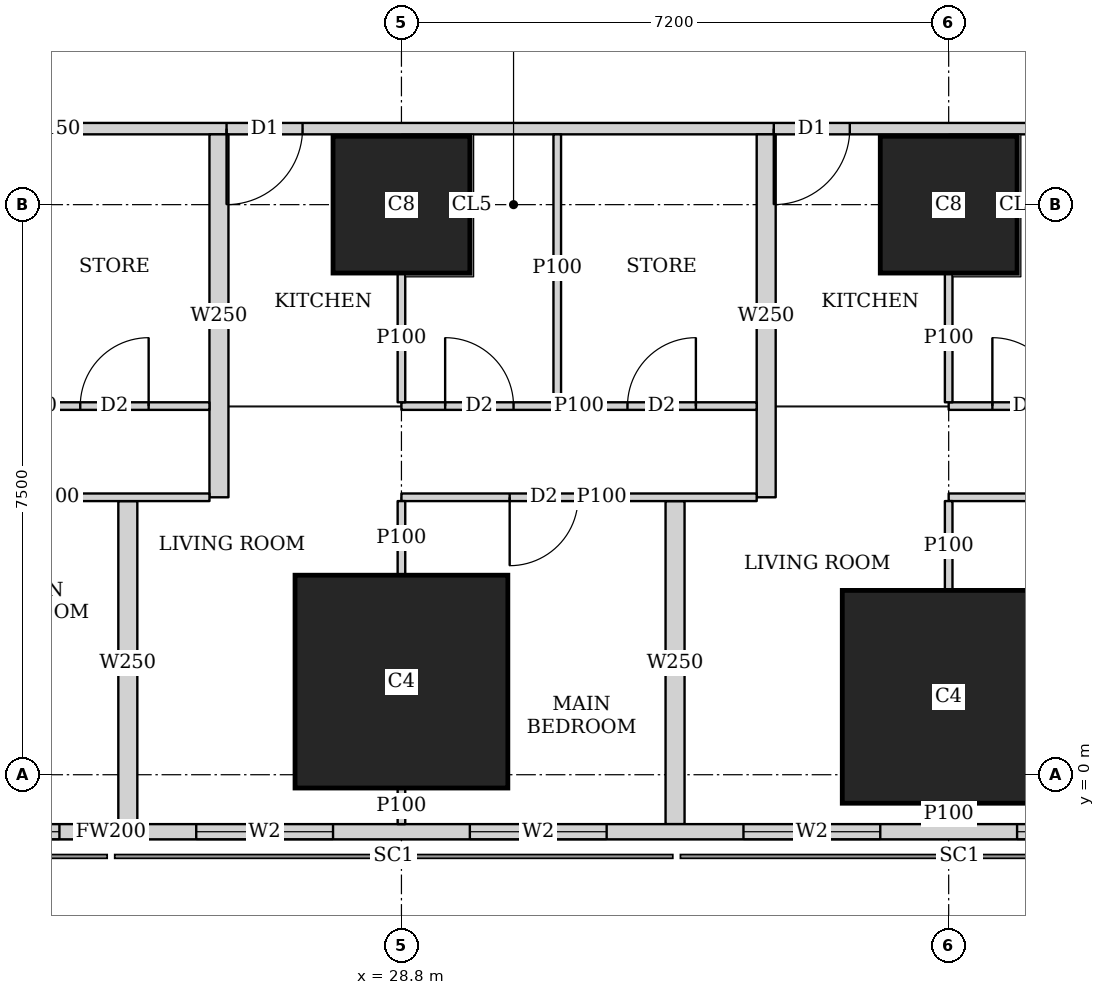
"""IFC4 building model, lengths in metres.
Left out: names, types, materials, properties, quantities, classifications, styles, units other than length and angle.
Written with IfcOpenShell. Run it as: python <this file> out.ifc"""

import sys

from ifc_helpers import new_model, si_unit, direction, frame, frame_2d, origin, origin_2d, place, context, subcontext, project, spatial, rectangle, extrude, element, fill, save


model = new_model("IFC4")
c1 = context("Model", 3, precision=1e-05, world=origin(), true_north=direction((0.0, 1.0)))
c2 = subcontext(c1, "Body", "Model", "MODEL_VIEW")
j1 = project(units=[si_unit("LENGTHUNIT", "METRE"), si_unit("PLANEANGLEUNIT", "RADIAN")], contexts=[c1])
p1 = place(None, origin())
s1 = spatial("IfcSite", under=j1, at=p1, CompositionType="ELEMENT")
p2 = place(p1, origin())
s2 = spatial("IfcBuilding", under=s1, at=p2, CompositionType="ELEMENT")
p3 = place(p2, frame((0.0, 0.0, 65.0)))
s3 = spatial("IfcBuildingStorey", under=s2, at=p3, CompositionType="ELEMENT", Elevation=65.0)
for number, where, z_axis, x_axis in (
    (1, (28.8, 1.225, 0.0), (0.0, 0.0, 1.0), (1.0, 0.0, 0.0)),
    (2, (36.0, 1.025, 0.0), (0.0, 0.0, 1.0), (1.0, 0.0, 0.0)),
):
    element("IfcColumn", number, at=place(p3, frame(where, z_axis=z_axis, x_axis=x_axis)), inside=s3, PredefinedType="COLUMN", context=c2, shape_type="SweptSolid", body=[
        extrude(rectangle(XDim=2.8, YDim=2.8, at=origin_2d()), origin(), (0.0, 0.0, 1.0), 3.75),
    ])
for number, where, z_axis, x_axis in (
    (3, (28.8, 7.5, 0.0), (0.0, 0.0, 1.0), (1.0, 0.0, 0.0)),
    (4, (36.0, 7.5, 0.0), (0.0, 0.0, 1.0), (1.0, 0.0, 0.0)),
):
    element("IfcColumn", number, at=place(p3, frame(where, z_axis=z_axis, x_axis=x_axis)), inside=s3, PredefinedType="COLUMN", context=c2, shape_type="SweptSolid", body=[
        extrude(rectangle(XDim=1.8, YDim=1.8, at=origin_2d()), origin(), (0.0, 0.0, 1.0), 3.75),
    ])
p4 = place(p3, frame((2.163, -0.75, 0.0), z_axis=(0.0, 0.0, 1.0), x_axis=(1.0, 0.0, 0.0)))
e5 = element("IfcWall", 5, at=p4, inside=s3, PredefinedType="SOLIDWALL", context=c2, shape_type="SweptSolid", body=[
    extrude(rectangle(XDim=45.628, YDim=0.2, at=frame_2d((22.814, 0.0))), origin(), (0.0, 0.0, 1.0), 3.5),
])
p5 = place(p4, frame((9.537, 0.0, 0.9)))
e6 = element("IfcOpeningElement", 6, at=p5, cuts=e5, PredefinedType="OPENING", context=c2, shape_type="SweptSolid", body=[
    extrude(rectangle(XDim=1.8, YDim=1.5, at=frame_2d((0.9, 0.75))), frame((0.0, 0.11, 0.0), z_axis=(0.0, -1.0, 0.0), x_axis=(1.0, 0.0, 0.0)), (0.0, 0.0, 1.0), 0.22),
])
p6 = place(p4, frame((13.137, 0.0, 0.9)))
e7 = element("IfcOpeningElement", 7, at=p6, cuts=e5, PredefinedType="OPENING", context=c2, shape_type="SweptSolid", body=[
    extrude(rectangle(XDim=1.8, YDim=1.5, at=frame_2d((0.9, 0.75))), frame((0.0, 0.11, 0.0), z_axis=(0.0, -1.0, 0.0), x_axis=(1.0, 0.0, 0.0)), (0.0, 0.0, 1.0), 0.22),
])
p7 = place(p4, frame((16.737, 0.0, 0.9)))
e8 = element("IfcOpeningElement", 8, at=p7, cuts=e5, PredefinedType="OPENING", context=c2, shape_type="SweptSolid", body=[
    extrude(rectangle(XDim=1.8, YDim=1.5, at=frame_2d((0.9, 0.75))), frame((0.0, 0.11, 0.0), z_axis=(0.0, -1.0, 0.0), x_axis=(1.0, 0.0, 0.0)), (0.0, 0.0, 1.0), 0.22),
])
p8 = place(p4, frame((20.337, 0.0, 0.9)))
e9 = element("IfcOpeningElement", 9, at=p8, cuts=e5, PredefinedType="OPENING", context=c2, shape_type="SweptSolid", body=[
    extrude(rectangle(XDim=1.8, YDim=1.5, at=frame_2d((0.9, 0.75))), frame((0.0, 0.11, 0.0), z_axis=(0.0, -1.0, 0.0), x_axis=(1.0, 0.0, 0.0)), (0.0, 0.0, 1.0), 0.22),
])
p9 = place(p4, frame((23.937, 0.0, 0.9)))
e10 = element("IfcOpeningElement", 10, at=p9, cuts=e5, PredefinedType="OPENING", context=c2, shape_type="SweptSolid", body=[
    extrude(rectangle(XDim=1.8, YDim=1.5, at=frame_2d((0.9, 0.75))), frame((0.0, 0.11, 0.0), z_axis=(0.0, -1.0, 0.0), x_axis=(1.0, 0.0, 0.0)), (0.0, 0.0, 1.0), 0.22),
])
p10 = place(p4, frame((27.537, 0.0, 0.9)))
e11 = element("IfcOpeningElement", 11, at=p10, cuts=e5, PredefinedType="OPENING", context=c2, shape_type="SweptSolid", body=[
    extrude(rectangle(XDim=1.8, YDim=1.5, at=frame_2d((0.9, 0.75))), frame((0.0, 0.11, 0.0), z_axis=(0.0, -1.0, 0.0), x_axis=(1.0, 0.0, 0.0)), (0.0, 0.0, 1.0), 0.22),
])
p11 = place(p4, frame((31.137, 0.0, 0.9)))
e12 = element("IfcOpeningElement", 12, at=p11, cuts=e5, PredefinedType="OPENING", context=c2, shape_type="SweptSolid", body=[
    extrude(rectangle(XDim=1.8, YDim=1.5, at=frame_2d((0.9, 0.75))), frame((0.0, 0.11, 0.0), z_axis=(0.0, -1.0, 0.0), x_axis=(1.0, 0.0, 0.0)), (0.0, 0.0, 1.0), 0.22),
])
p12 = place(p4, frame((34.737, 0.0, 0.9)))
e13 = element("IfcOpeningElement", 13, at=p12, cuts=e5, PredefinedType="OPENING", context=c2, shape_type="SweptSolid", body=[
    extrude(rectangle(XDim=1.8, YDim=1.5, at=frame_2d((0.9, 0.75))), frame((0.0, 0.11, 0.0), z_axis=(0.0, -1.0, 0.0), x_axis=(1.0, 0.0, 0.0)), (0.0, 0.0, 1.0), 0.22),
])
p13 = place(p3, frame((40.054, 8.5, 0.0), z_axis=(0.0, 0.0, 1.0), x_axis=(-1.0, 0.0, 0.0)))
e14 = element("IfcWall", 14, at=p13, inside=s3, PredefinedType="SOLIDWALL", context=c2, shape_type="SweptSolid", body=[
    extrude(rectangle(XDim=31.704, YDim=0.15, at=frame_2d((15.852, 0.0))), origin(), (0.0, 0.0, 1.0), 3.5),
])
p14 = place(p13, frame((28.104, 0.0, 0.0)))
e15 = element("IfcOpeningElement", 15, at=p14, cuts=e14, PredefinedType="OPENING", context=c2, shape_type="SweptSolid", body=[
    extrude(rectangle(XDim=1.0, YDim=2.1, at=frame_2d((0.5, 1.05))), frame((0.0, 0.085, 0.0), z_axis=(0.0, -1.0, 0.0), x_axis=(1.0, 0.0, 0.0)), (0.0, 0.0, 1.0), 0.17),
])
p15 = place(p13, frame((19.755, 0.0, 0.0)))
e16 = element("IfcOpeningElement", 16, at=p15, cuts=e14, PredefinedType="OPENING", context=c2, shape_type="SweptSolid", body=[
    extrude(rectangle(XDim=1.0, YDim=2.1, at=frame_2d((0.5, 1.05))), frame((0.0, 0.085, 0.0), z_axis=(0.0, -1.0, 0.0), x_axis=(1.0, 0.0, 0.0)), (0.0, 0.0, 1.0), 0.17),
])
p16 = place(p13, frame((12.555, 0.0, 0.0)))
e17 = element("IfcOpeningElement", 17, at=p16, cuts=e14, PredefinedType="OPENING", context=c2, shape_type="SweptSolid", body=[
    extrude(rectangle(XDim=1.0, YDim=2.1, at=frame_2d((0.5, 1.05))), frame((0.0, 0.085, 0.0), z_axis=(0.0, -1.0, 0.0), x_axis=(1.0, 0.0, 0.0)), (0.0, 0.0, 1.0), 0.17),
])
p17 = place(p13, frame((5.355, 0.0, 0.0)))
e18 = element("IfcOpeningElement", 18, at=p17, cuts=e14, PredefinedType="OPENING", context=c2, shape_type="SweptSolid", body=[
    extrude(rectangle(XDim=1.0, YDim=2.1, at=frame_2d((0.5, 1.05))), frame((0.0, 0.085, 0.0), z_axis=(0.0, -1.0, 0.0), x_axis=(1.0, 0.0, 0.0)), (0.0, 0.0, 1.0), 0.17),
])
p18 = place(p3, frame((33.68, 42.723, 0.0), z_axis=(0.0, 0.0, 1.0), x_axis=(0.185624129307, -0.98262082342, 0.0)))
e19 = element("IfcWall", 19, at=p18, inside=s3, PredefinedType="SOLIDWALL", context=c2, shape_type="SweptSolid", body=[
    extrude(rectangle(XDim=41.051, YDim=0.15, at=frame_2d((20.526, 0.0))), origin(), (0.0, 0.0, 1.0), 2.5),
])
p19 = place(p18, frame((13.577, 0.0, 0.0)))
e20 = element("IfcOpeningElement", 20, at=p19, cuts=e19, PredefinedType="OPENING", context=c2, shape_type="SweptSolid", body=[
    extrude(rectangle(XDim=1.0, YDim=2.1, at=frame_2d((0.5, 1.05))), frame((0.0, 0.085, 0.0), z_axis=(0.0, -1.0, 0.0), x_axis=(1.0, 0.0, 0.0)), (0.0, 0.0, 1.0), 0.17),
])
p20 = place(p18, frame((17.394, 0.0, 0.0)))
e21 = element("IfcOpeningElement", 21, at=p20, cuts=e19, PredefinedType="OPENING", context=c2, shape_type="SweptSolid", body=[
    extrude(rectangle(XDim=1.0, YDim=2.1, at=frame_2d((0.5, 1.05))), frame((0.0, 0.085, 0.0), z_axis=(0.0, -1.0, 0.0), x_axis=(1.0, 0.0, 0.0)), (0.0, 0.0, 1.0), 0.17),
])
p21 = place(p18, frame((26.758, 0.0, 0.0)))
e22 = element("IfcOpeningElement", 22, at=p21, cuts=e19, PredefinedType="OPENING", context=c2, shape_type="SweptSolid", body=[
    extrude(rectangle(XDim=1.0, YDim=2.1, at=frame_2d((0.5, 1.05))), frame((0.0, 0.085, 0.0), z_axis=(0.0, -1.0, 0.0), x_axis=(1.0, 0.0, 0.0)), (0.0, 0.0, 1.0), 0.17),
])
p22 = place(p18, frame((32.193, 0.0, 0.0)))
e23 = element("IfcOpeningElement", 23, at=p22, cuts=e19, PredefinedType="OPENING", context=c2, shape_type="SweptSolid", body=[
    extrude(rectangle(XDim=1.0, YDim=2.1, at=frame_2d((0.5, 1.05))), frame((0.0, 0.085, 0.0), z_axis=(0.0, -1.0, 0.0), x_axis=(1.0, 0.0, 0.0)), (0.0, 0.0, 1.0), 0.17),
])
p23 = place(p3, frame((26.274, 3.65, 0.0), z_axis=(0.0, 0.0, 1.0), x_axis=(-1.0, 0.0, 0.0)))
e24 = element("IfcWall", 24, at=p23, inside=s3, PredefinedType="PARTITIONING", context=c2, shape_type="SweptSolid", body=[
    extrude(rectangle(XDim=4.674, YDim=0.1, at=frame_2d((2.337, 0.0))), origin(), (0.0, 0.0, 1.0), 3.5),
])
p24 = place(p23, frame((2.35, 0.0, 0.0)))
e25 = element("IfcOpeningElement", 25, at=p24, cuts=e24, PredefinedType="OPENING", context=c2, shape_type="SweptSolid", body=[
    extrude(rectangle(XDim=0.9, YDim=2.1, at=frame_2d((0.45, 1.05))), frame((0.0, 0.06, 0.0), z_axis=(0.0, -1.0, 0.0), x_axis=(1.0, 0.0, 0.0)), (0.0, 0.0, 1.0), 0.12),
])
p25 = place(p3, frame((26.274, 4.85, 0.0), z_axis=(0.0, 0.0, 1.0), x_axis=(-1.0, 0.0, 0.0)))
e26 = element("IfcWall", 26, at=p25, inside=s3, PredefinedType="PARTITIONING", context=c2, shape_type="SweptSolid", body=[
    extrude(rectangle(XDim=4.674, YDim=0.1, at=frame_2d((2.337, 0.0))), origin(), (0.0, 0.0, 1.0), 3.5),
])
p26 = place(p25, frame((3.199, 0.0, 0.0)))
e27 = element("IfcOpeningElement", 27, at=p26, cuts=e26, PredefinedType="OPENING", context=c2, shape_type="SweptSolid", body=[
    extrude(rectangle(XDim=0.9, YDim=2.1, at=frame_2d((0.45, 1.05))), frame((0.0, 0.06, 0.0), z_axis=(0.0, -1.0, 0.0), x_axis=(1.0, 0.0, 0.0)), (0.0, 0.0, 1.0), 0.12),
])
p27 = place(p25, frame((0.8, 0.0, 0.0)))
e28 = element("IfcOpeningElement", 28, at=p27, cuts=e26, PredefinedType="OPENING", context=c2, shape_type="SweptSolid", body=[
    extrude(rectangle(XDim=0.9, YDim=2.1, at=frame_2d((0.45, 1.05))), frame((0.0, 0.06, 0.0), z_axis=(0.0, -1.0, 0.0), x_axis=(1.0, 0.0, 0.0)), (0.0, 0.0, 1.0), 0.12),
])
p28 = place(p3, frame((33.474, 3.65, 0.0), z_axis=(0.0, 0.0, 1.0), x_axis=(-1.0, 0.0, 0.0)))
e29 = element("IfcWall", 29, at=p28, inside=s3, PredefinedType="PARTITIONING", context=c2, shape_type="SweptSolid", body=[
    extrude(rectangle(XDim=4.674, YDim=0.1, at=frame_2d((2.337, 0.0))), origin(), (0.0, 0.0, 1.0), 3.5),
])
p29 = place(p28, frame((2.35, 0.0, 0.0)))
e30 = element("IfcOpeningElement", 30, at=p29, cuts=e29, PredefinedType="OPENING", context=c2, shape_type="SweptSolid", body=[
    extrude(rectangle(XDim=0.9, YDim=2.1, at=frame_2d((0.45, 1.05))), frame((0.0, 0.06, 0.0), z_axis=(0.0, -1.0, 0.0), x_axis=(1.0, 0.0, 0.0)), (0.0, 0.0, 1.0), 0.12),
])
p30 = place(p3, frame((33.474, 4.85, 0.0), z_axis=(0.0, 0.0, 1.0), x_axis=(-1.0, 0.0, 0.0)))
e31 = element("IfcWall", 31, at=p30, inside=s3, PredefinedType="PARTITIONING", context=c2, shape_type="SweptSolid", body=[
    extrude(rectangle(XDim=4.674, YDim=0.1, at=frame_2d((2.337, 0.0))), origin(), (0.0, 0.0, 1.0), 3.5),
])
p31 = place(p30, frame((3.199, 0.0, 0.0)))
e32 = element("IfcOpeningElement", 32, at=p31, cuts=e31, PredefinedType="OPENING", context=c2, shape_type="SweptSolid", body=[
    extrude(rectangle(XDim=0.9, YDim=2.1, at=frame_2d((0.45, 1.05))), frame((0.0, 0.06, 0.0), z_axis=(0.0, -1.0, 0.0), x_axis=(1.0, 0.0, 0.0)), (0.0, 0.0, 1.0), 0.12),
])
p32 = place(p30, frame((0.8, 0.0, 0.0)))
e33 = element("IfcOpeningElement", 33, at=p32, cuts=e31, PredefinedType="OPENING", context=c2, shape_type="SweptSolid", body=[
    extrude(rectangle(XDim=0.9, YDim=2.1, at=frame_2d((0.45, 1.05))), frame((0.0, 0.06, 0.0), z_axis=(0.0, -1.0, 0.0), x_axis=(1.0, 0.0, 0.0)), (0.0, 0.0, 1.0), 0.12),
])
p33 = place(p3, frame((28.8, -0.65, 0.0), z_axis=(0.0, 0.0, 1.0), x_axis=(0.0, 1.0, 0.0)))
e34 = element("IfcWall", 34, at=p33, inside=s3, PredefinedType="PARTITIONING", context=c2, shape_type="SweptSolid", body=[
    extrude(rectangle(XDim=0.474, YDim=0.1, at=frame_2d((0.237, 0.0))), origin(), (0.0, 0.0, 1.0), 3.5),
])
p34 = place(p3, frame((28.8, 2.626, 0.0), z_axis=(0.0, 0.0, 1.0), x_axis=(0.0, 1.0, 0.0)))
e35 = element("IfcWall", 35, at=p34, inside=s3, PredefinedType="PARTITIONING", context=c2, shape_type="SweptSolid", body=[
    extrude(rectangle(XDim=0.974, YDim=0.1, at=frame_2d((0.487, 0.0))), origin(), (0.0, 0.0, 1.0), 3.5),
])
p35 = place(p3, frame((28.8, 4.9, 0.0), z_axis=(0.0, 0.0, 1.0), x_axis=(0.0, 1.0, 0.0)))
e36 = element("IfcWall", 36, at=p35, inside=s3, PredefinedType="PARTITIONING", context=c2, shape_type="SweptSolid", body=[
    extrude(rectangle(XDim=1.699, YDim=0.1, at=frame_2d((0.85, 0.0))), origin(), (0.0, 0.0, 1.0), 3.5),
])
p36 = place(p3, frame((30.85, 4.9, 0.0), z_axis=(0.0, 0.0, 1.0), x_axis=(0.0, 1.0, 0.0)))
e37 = element("IfcWall", 37, at=p36, inside=s3, PredefinedType="PARTITIONING", context=c2, shape_type="SweptSolid", body=[
    extrude(rectangle(XDim=3.525, YDim=0.1, at=frame_2d((1.763, 0.0))), origin(), (0.0, 0.0, 1.0), 3.5),
])
p37 = place(p3, frame((25.2, -0.65, 0.0), z_axis=(0.0, 0.0, 1.0), x_axis=(0.0, 1.0, 0.0)))
e38 = element("IfcWall", 38, at=p37, inside=s3, PredefinedType="SOLIDWALL", context=c2, shape_type="SweptSolid", body=[
    extrude(rectangle(XDim=4.25, YDim=0.25, at=frame_2d((2.125, 0.0))), origin(), (0.0, 0.0, 1.0), 2.05),
])
p38 = place(p3, frame((26.399, 3.65, 0.0), z_axis=(0.0, 0.0, 1.0), x_axis=(0.0, 1.0, 0.0)))
e39 = element("IfcWall", 39, at=p38, inside=s3, PredefinedType="SOLIDWALL", context=c2, shape_type="SweptSolid", body=[
    extrude(rectangle(XDim=4.775, YDim=0.25, at=frame_2d((2.388, 0.0))), origin(), (0.0, 0.0, 1.0), 3.5),
])
p39 = place(p3, frame((40.975, 3.65, 0.0), z_axis=(0.0, 0.0, 1.0), x_axis=(-1.0, 0.0, 0.0)))
e40 = element("IfcWall", 40, at=p39, inside=s3, PredefinedType="PARTITIONING", context=c2, shape_type="SweptSolid", body=[
    extrude(rectangle(XDim=4.975, YDim=0.1, at=frame_2d((2.488, 0.0))), origin(), (0.0, 0.0, 1.0), 3.5),
])
p40 = place(p39, frame((2.65, 0.0, 0.0)))
e41 = element("IfcOpeningElement", 41, at=p40, cuts=e40, PredefinedType="OPENING", context=c2, shape_type="SweptSolid", body=[
    extrude(rectangle(XDim=0.9, YDim=2.1, at=frame_2d((0.45, 1.05))), frame((0.0, 0.06, 0.0), z_axis=(0.0, -1.0, 0.0), x_axis=(1.0, 0.0, 0.0)), (0.0, 0.0, 1.0), 0.12),
])
p41 = place(p3, frame((40.748, 4.85, 0.0), z_axis=(0.0, 0.0, 1.0), x_axis=(-1.0, 0.0, 0.0)))
e42 = element("IfcWall", 42, at=p41, inside=s3, PredefinedType="PARTITIONING", context=c2, shape_type="SweptSolid", body=[
    extrude(rectangle(XDim=4.748, YDim=0.1, at=frame_2d((2.374, 0.0))), origin(), (0.0, 0.0, 1.0), 3.5),
])
p42 = place(p41, frame((3.273, 0.0, 0.0)))
e43 = element("IfcOpeningElement", 43, at=p42, cuts=e42, PredefinedType="OPENING", context=c2, shape_type="SweptSolid", body=[
    extrude(rectangle(XDim=0.9, YDim=2.1, at=frame_2d((0.45, 1.05))), frame((0.0, 0.06, 0.0), z_axis=(0.0, -1.0, 0.0), x_axis=(1.0, 0.0, 0.0)), (0.0, 0.0, 1.0), 0.12),
])
p43 = place(p41, frame((0.15, 0.0, 0.0)))
e44 = element("IfcOpeningElement", 44, at=p43, cuts=e42, PredefinedType="OPENING", context=c2, shape_type="SweptSolid", body=[
    extrude(rectangle(XDim=0.9, YDim=2.1, at=frame_2d((0.45, 1.05))), frame((0.0, 0.06, 0.0), z_axis=(0.0, -1.0, 0.0), x_axis=(1.0, 0.0, 0.0)), (0.0, 0.0, 1.0), 0.12),
])
p44 = place(p41, frame((1.473, 0.0, 0.0)))
e45 = element("IfcOpeningElement", 45, at=p44, cuts=e42, PredefinedType="OPENING", context=c2, shape_type="SweptSolid", body=[
    extrude(rectangle(XDim=0.9, YDim=2.1, at=frame_2d((0.45, 1.05))), frame((0.0, 0.06, 0.0), z_axis=(0.0, -1.0, 0.0), x_axis=(1.0, 0.0, 0.0)), (0.0, 0.0, 1.0), 0.12),
])
p45 = place(p3, frame((36.0, -0.65, 0.0), z_axis=(0.0, 0.0, 1.0), x_axis=(0.0, 1.0, 0.0)))
e46 = element("IfcWall", 46, at=p45, inside=s3, PredefinedType="PARTITIONING", context=c2, shape_type="SweptSolid", body=[
    extrude(rectangle(XDim=0.274, YDim=0.1, at=frame_2d((0.137, 0.0))), origin(), (0.0, 0.0, 1.0), 3.5),
])
p46 = place(p3, frame((36.0, 2.426, 0.0), z_axis=(0.0, 0.0, 1.0), x_axis=(0.0, 1.0, 0.0)))
e47 = element("IfcWall", 47, at=p46, inside=s3, PredefinedType="PARTITIONING", context=c2, shape_type="SweptSolid", body=[
    extrude(rectangle(XDim=1.174, YDim=0.1, at=frame_2d((0.587, 0.0))), origin(), (0.0, 0.0, 1.0), 3.5),
])
p47 = place(p3, frame((36.0, 4.9, 0.0), z_axis=(0.0, 0.0, 1.0), x_axis=(0.0, 1.0, 0.0)))
e48 = element("IfcWall", 48, at=p47, inside=s3, PredefinedType="PARTITIONING", context=c2, shape_type="SweptSolid", body=[
    extrude(rectangle(XDim=1.699, YDim=0.1, at=frame_2d((0.85, 0.0))), origin(), (0.0, 0.0, 1.0), 3.5),
])
p48 = place(p3, frame((32.4, -0.65, 0.0), z_axis=(0.0, 0.0, 1.0), x_axis=(0.0, 1.0, 0.0)))
e49 = element("IfcWall", 49, at=p48, inside=s3, PredefinedType="SOLIDWALL", context=c2, shape_type="SweptSolid", body=[
    extrude(rectangle(XDim=4.25, YDim=0.25, at=frame_2d((2.125, 0.0))), origin(), (0.0, 0.0, 1.0), 2.05),
])
p49 = place(p3, frame((33.599, 3.65, 0.0), z_axis=(0.0, 0.0, 1.0), x_axis=(0.0, 1.0, 0.0)))
e50 = element("IfcWall", 50, at=p49, inside=s3, PredefinedType="SOLIDWALL", context=c2, shape_type="SweptSolid", body=[
    extrude(rectangle(XDim=4.775, YDim=0.25, at=frame_2d((2.388, 0.0))), origin(), (0.0, 0.0, 1.0), 3.5),
])
p50 = place(p8, origin())
e51 = element("IfcWindow", 51, at=p50, inside=s3, PartitioningType="SINGLE_PANEL", PredefinedType="WINDOW", context=c2, shape_type="SweptSolid", body=[
    extrude(rectangle(XDim=1.8, YDim=1.5, at=frame_2d((0.9, 0.75))), frame((0.0, 0.03, 0.0), z_axis=(0.0, -1.0, 0.0), x_axis=(1.0, 0.0, 0.0)), (0.0, 0.0, 1.0), 0.06),
])
fill(e9, e51)
p51 = place(p9, origin())
e52 = element("IfcWindow", 52, at=p51, inside=s3, PartitioningType="SINGLE_PANEL", PredefinedType="WINDOW", context=c2, shape_type="SweptSolid", body=[
    extrude(rectangle(XDim=1.8, YDim=1.5, at=frame_2d((0.9, 0.75))), frame((0.0, 0.03, 0.0), z_axis=(0.0, -1.0, 0.0), x_axis=(1.0, 0.0, 0.0)), (0.0, 0.0, 1.0), 0.06),
])
fill(e10, e52)
p52 = place(p10, origin())
e53 = element("IfcWindow", 53, at=p52, inside=s3, PartitioningType="SINGLE_PANEL", PredefinedType="WINDOW", context=c2, shape_type="SweptSolid", body=[
    extrude(rectangle(XDim=1.8, YDim=1.5, at=frame_2d((0.9, 0.75))), frame((0.0, 0.03, 0.0), z_axis=(0.0, -1.0, 0.0), x_axis=(1.0, 0.0, 0.0)), (0.0, 0.0, 1.0), 0.06),
])
fill(e11, e53)
p53 = place(p11, origin())
e54 = element("IfcWindow", 54, at=p53, inside=s3, PartitioningType="SINGLE_PANEL", PredefinedType="WINDOW", context=c2, shape_type="SweptSolid", body=[
    extrude(rectangle(XDim=1.8, YDim=1.5, at=frame_2d((0.9, 0.75))), frame((0.0, 0.03, 0.0), z_axis=(0.0, -1.0, 0.0), x_axis=(1.0, 0.0, 0.0)), (0.0, 0.0, 1.0), 0.06),
])
fill(e12, e54)
p54 = place(p12, origin())
e55 = element("IfcWindow", 55, at=p54, inside=s3, PartitioningType="SINGLE_PANEL", PredefinedType="WINDOW", context=c2, shape_type="SweptSolid", body=[
    extrude(rectangle(XDim=1.8, YDim=1.5, at=frame_2d((0.9, 0.75))), frame((0.0, 0.03, 0.0), z_axis=(0.0, -1.0, 0.0), x_axis=(1.0, 0.0, 0.0)), (0.0, 0.0, 1.0), 0.06),
])
fill(e13, e55)
p55 = place(p27, origin())
e56 = element("IfcDoor", 56, at=p55, inside=s3, OperationType="SINGLE_SWING_RIGHT", PredefinedType="DOOR", context=c2, shape_type="SweptSolid", body=[
    extrude(rectangle(XDim=0.9, YDim=2.1, at=frame_2d((0.45, 1.05))), frame((0.0, 0.025, 0.0), z_axis=(0.0, -1.0, 0.0), x_axis=(1.0, 0.0, 0.0)), (0.0, 0.0, 1.0), 0.05),
])
fill(e28, e56)
p56 = place(p29, origin())
e57 = element("IfcDoor", 57, at=p56, inside=s3, OperationType="SINGLE_SWING_RIGHT", PredefinedType="DOOR", context=c2, shape_type="SweptSolid", body=[
    extrude(rectangle(XDim=0.9, YDim=2.1, at=frame_2d((0.45, 1.05))), frame((0.0, 0.025, 0.0), z_axis=(0.0, -1.0, 0.0), x_axis=(1.0, 0.0, 0.0)), (0.0, 0.0, 1.0), 0.05),
])
fill(e30, e57)
p57 = place(p31, origin())
e58 = element("IfcDoor", 58, at=p57, inside=s3, OperationType="SINGLE_SWING_LEFT", PredefinedType="DOOR", context=c2, shape_type="SweptSolid", body=[
    extrude(rectangle(XDim=0.9, YDim=2.1, at=frame_2d((0.45, 1.05))), frame((0.0, 0.025, 0.0), z_axis=(0.0, -1.0, 0.0), x_axis=(1.0, 0.0, 0.0)), (0.0, 0.0, 1.0), 0.05),
])
fill(e32, e58)
p58 = place(p32, origin())
e59 = element("IfcDoor", 59, at=p58, inside=s3, OperationType="SINGLE_SWING_RIGHT", PredefinedType="DOOR", context=c2, shape_type="SweptSolid", body=[
    extrude(rectangle(XDim=0.9, YDim=2.1, at=frame_2d((0.45, 1.05))), frame((0.0, 0.025, 0.0), z_axis=(0.0, -1.0, 0.0), x_axis=(1.0, 0.0, 0.0)), (0.0, 0.0, 1.0), 0.05),
])
fill(e33, e59)
p59 = place(p16, origin())
e60 = element("IfcDoor", 60, at=p59, inside=s3, OperationType="SINGLE_SWING_RIGHT", PredefinedType="DOOR", context=c2, shape_type="SweptSolid", body=[
    extrude(rectangle(XDim=1.0, YDim=2.1, at=frame_2d((0.5, 1.05))), frame((0.0, 0.025, 0.0), z_axis=(0.0, -1.0, 0.0), x_axis=(1.0, 0.0, 0.0)), (0.0, 0.0, 1.0), 0.05),
])
fill(e17, e60)
p60 = place(p42, origin())
e61 = element("IfcDoor", 61, at=p60, inside=s3, OperationType="SINGLE_SWING_LEFT", PredefinedType="DOOR", context=c2, shape_type="SweptSolid", body=[
    extrude(rectangle(XDim=0.9, YDim=2.1, at=frame_2d((0.45, 1.05))), frame((0.0, 0.025, 0.0), z_axis=(0.0, -1.0, 0.0), x_axis=(1.0, 0.0, 0.0)), (0.0, 0.0, 1.0), 0.05),
])
fill(e43, e61)
p61 = place(p17, origin())
e62 = element("IfcDoor", 62, at=p61, inside=s3, OperationType="SINGLE_SWING_RIGHT", PredefinedType="DOOR", context=c2, shape_type="SweptSolid", body=[
    extrude(rectangle(XDim=1.0, YDim=2.1, at=frame_2d((0.5, 1.05))), frame((0.0, 0.025, 0.0), z_axis=(0.0, -1.0, 0.0), x_axis=(1.0, 0.0, 0.0)), (0.0, 0.0, 1.0), 0.05),
])
fill(e18, e62)
save(model, sys.argv[1])
